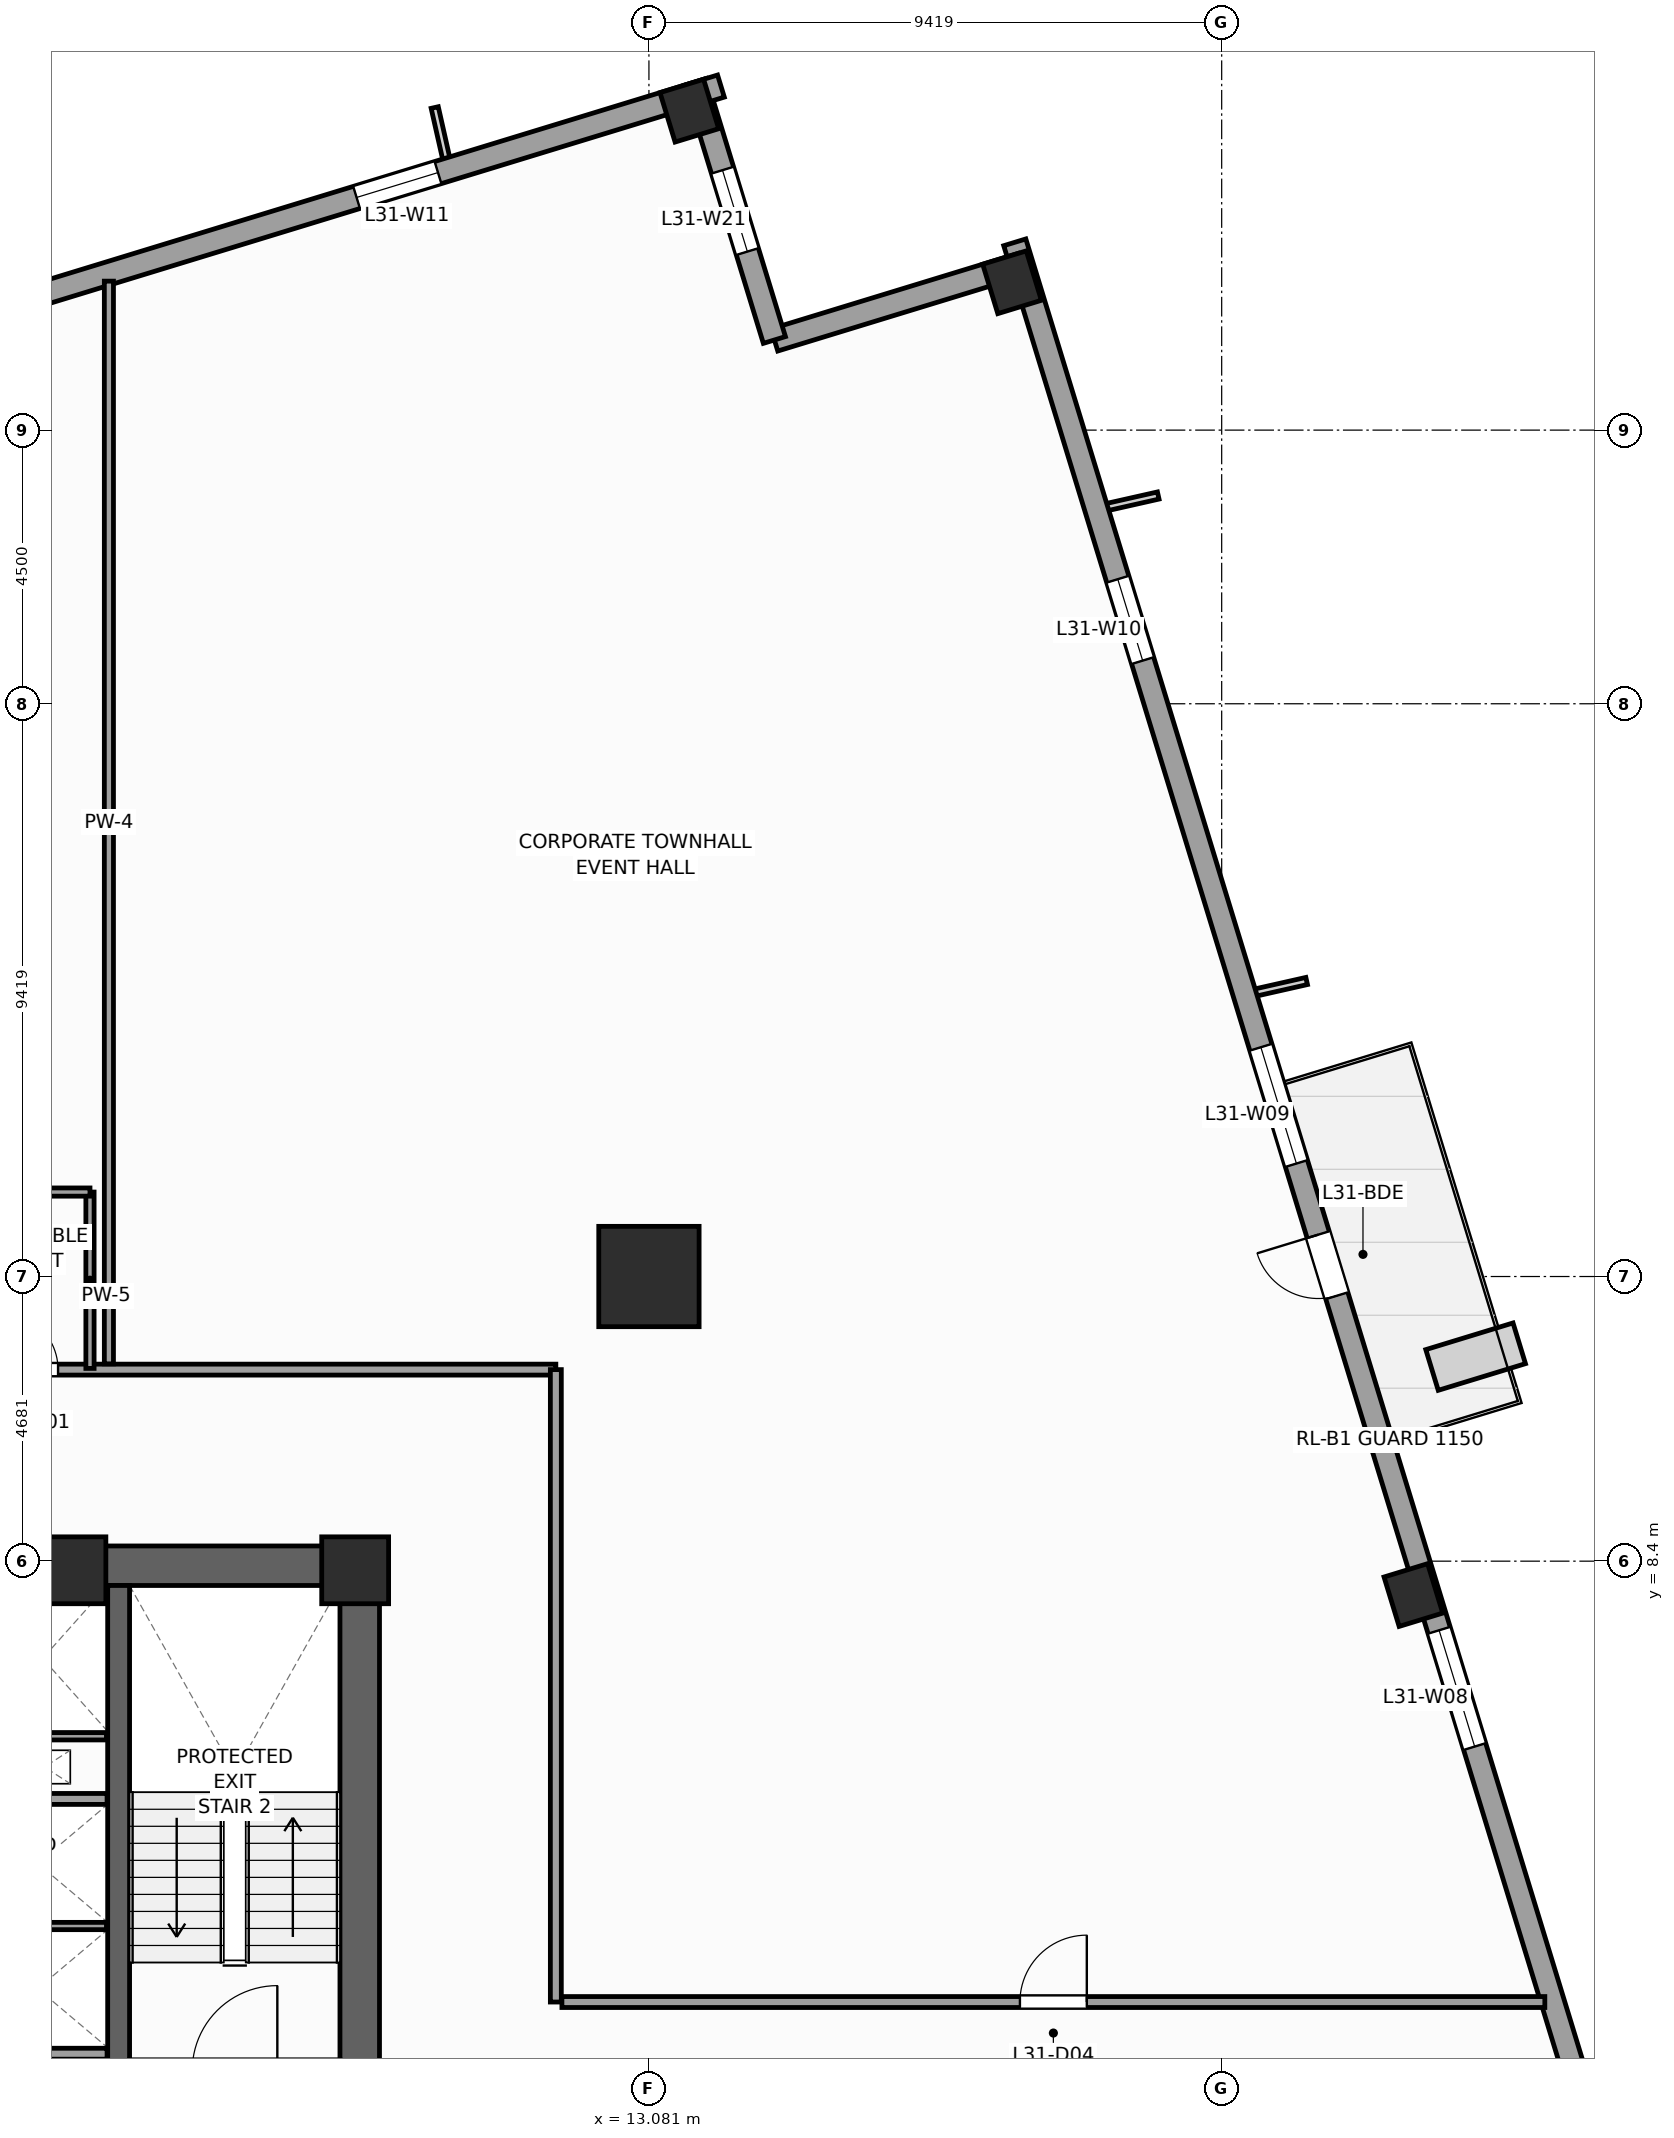
"""IFC4 building model, lengths in metres.
Left out: names, types, materials, properties, quantities, classifications, styles, units other than length and angle.
Written with IfcOpenShell. Run it as: python <this file> out.ifc"""

import sys

from ifc_helpers import new_model, si_unit, direction, frame, frame_2d, origin, origin_2d, place, context, subcontext, project, spatial, rectangle, extrude, source, transform, mapped, element, fill, save


model = new_model("IFC4")
c1 = context("Model", 3, precision=1e-05, world=origin(), true_north=direction((0.0, 1.0)))
c2 = subcontext(c1, "Body", "Model", "MODEL_VIEW")
j1 = project(units=[si_unit("LENGTHUNIT", "METRE"), si_unit("PLANEANGLEUNIT", "RADIAN")], contexts=[c1])
p1 = place(None, origin())
s1 = spatial("IfcSite", under=j1, at=p1, CompositionType="ELEMENT")
p2 = place(p1, origin())
s2 = spatial("IfcBuilding", under=s1, at=p2, CompositionType="ELEMENT")
p3 = place(p2, frame((0.0, 0.0, 131.2)))
s3 = spatial("IfcBuildingStorey", under=s2, at=p3, CompositionType="ELEMENT", Elevation=131.2)
p4 = place(p3, frame((-8.65, 8.325, 0.0), z_axis=(0.0, 0.0, 1.0), x_axis=(1.0, 0.0, 0.0)))
e1 = element("IfcWall", 1, at=p4, inside=s3, PredefinedType="SHEAR", context=c2, shape_type="SweptSolid", body=[
    extrude(rectangle(XDim=17.3, YDim=0.65, at=frame_2d((8.65, 0.0))), origin(), (0.0, 0.0, 1.0), 4.0),
])
p5 = place(p3, frame((8.325, -8.0, 0.0), z_axis=(0.0, 0.0, 1.0), x_axis=(0.0, 1.0, 0.0)))
e2 = element("IfcWall", 2, at=p5, inside=s3, PredefinedType="SHEAR", context=c2, shape_type="SweptSolid", body=[
    extrude(rectangle(XDim=16.0, YDim=0.65, at=frame_2d((8.0, 0.0))), origin(), (0.0, 0.0, 1.0), 4.0),
])
p6 = place(p5, frame((4.69, 0.0, 0.0)))
e3 = element("IfcOpeningElement", 3, at=p6, cuts=e2, PredefinedType="OPENING", context=c2, shape_type="SweptSolid", body=[
    extrude(rectangle(XDim=1.3, YDim=2.2, at=frame_2d((0.65, 1.1))), frame((0.0, 0.335, 0.0), z_axis=(0.0, -1.0, 0.0), x_axis=(1.0, 0.0, 0.0)), (0.0, 0.0, 1.0), 0.67),
])
p7 = place(p3, frame((4.36, -8.0, 0.0), z_axis=(0.0, 0.0, 1.0), x_axis=(0.0, 1.0, 0.0)))
e4 = element("IfcWall", 4, at=p7, inside=s3, PredefinedType="SHEAR", context=c2, shape_type="SweptSolid", body=[
    extrude(rectangle(XDim=16.0, YDim=0.36, at=frame_2d((8.0, 0.0))), origin(), (0.0, 0.0, 1.0), 4.0),
])
m1 = source(origin(), c2, "Body", "SweptSolid", [
    extrude(rectangle(XDim=1.1, YDim=1.1, at=origin_2d()), origin(), (0.0, 0.0, 1.0), 4.0),
])
for number, where, z_axis, x_axis in (
    (5, (8.25, 8.25, 0.0), (0.0, 0.0, 1.0), (1.0, 0.0, 0.0)),
    (6, (3.6, 8.25, 0.0), (0.0, 0.0, 1.0), (1.0, 0.0, 0.0)),
):
    element("IfcColumn", number, at=place(p3, frame(where, z_axis=z_axis, x_axis=x_axis)), inside=s3, PredefinedType="PILASTER", context=c2, shape_type="MappedRepresentation", body=[
        mapped(m1, transform((0.0, 0.0, 0.0), scale=1.0)),
    ])
m2 = source(origin(), c2, "Body", "SweptSolid", [
    extrude(rectangle(XDim=1.65, YDim=1.65, at=origin_2d()), origin(), (0.0, 0.0, 1.0), 4.0),
])
p8 = place(p3, frame((13.081, 13.081, 0.0), z_axis=(0.0, 0.0, 1.0), x_axis=(1.0, 0.0, 0.0)))
e7 = element("IfcColumn", 7, at=p8, inside=s3, PredefinedType="COLUMN", context=c2, shape_type="MappedRepresentation", body=[
    mapped(m2, transform((0.0, 0.0, 0.0), scale=1.0)),
])
m3 = source(origin(), c2, "Body", "SweptSolid", [
    extrude(rectangle(XDim=0.75, YDim=0.85, at=origin_2d()), origin(), (0.0, 0.0, 1.0), 4.0),
])
for number, where, z_axis, x_axis in (
    (8, (25.653, 7.843, 0.0), (0.0, 0.0, 1.0), (0.956, 0.292, 0.0)),
    (9, (19.052, 29.431, 0.0), (0.0, 0.0, 1.0), (0.956, 0.292, 0.0)),
    (10, (13.746, 32.253, 0.0), (0.0, 0.0, 1.0), (0.956, 0.292, 0.0)),
):
    element("IfcColumn", number, at=place(p3, frame(where, z_axis=z_axis, x_axis=x_axis)), inside=s3, PredefinedType="COLUMN", context=c2, shape_type="MappedRepresentation", body=[
        mapped(m3, transform((0.0, 0.0, 0.0), scale=1.0)),
    ])
p9 = place(p3, frame((32.658, -14.265, 0.0), z_axis=(0.0, 0.0, 1.0), x_axis=(-0.292373127906, 0.956304320851, 0.0)))
e11 = element("IfcWall", 11, at=p9, inside=s3, PredefinedType="STANDARD", context=c2, shape_type="SweptSolid", body=[
    extrude(rectangle(XDim=46.38, YDim=0.38, at=frame_2d((23.19, 0.0))), origin(), (0.0, 0.0, 1.0), 3.14),
])
p10 = place(p9, frame((28.265, 0.0, 0.0)))
e12 = element("IfcOpeningElement", 12, at=p10, cuts=e11, PredefinedType="OPENING", context=c2, shape_type="SweptSolid", body=[
    extrude(rectangle(XDim=1.05, YDim=2.25, at=frame_2d((0.525, 1.125))), frame((0.0, 0.2, 0.0), z_axis=(0.0, -1.0, 0.0), x_axis=(1.0, 0.0, 0.0)), (0.0, 0.0, 1.0), 0.4),
])
p11 = place(p9, frame((4.865, 0.0, 0.51)))
e13 = element("IfcOpeningElement", 13, at=p11, cuts=e11, PredefinedType="OPENING", context=c2, shape_type="SweptSolid", body=[
    extrude(rectangle(XDim=1.4, YDim=2.4, at=frame_2d((0.7, 1.2))), frame((0.0, 0.2, 0.0), z_axis=(0.0, -1.0, 0.0), x_axis=(1.0, 0.0, 0.0)), (0.0, 0.0, 1.0), 0.4),
])
p12 = place(p9, frame((10.95, 0.0, 0.51)))
e14 = element("IfcOpeningElement", 14, at=p12, cuts=e11, PredefinedType="OPENING", context=c2, shape_type="SweptSolid", body=[
    extrude(rectangle(XDim=2.0, YDim=2.4, at=frame_2d((1.0, 1.2))), frame((0.0, 0.2, 0.0), z_axis=(0.0, -1.0, 0.0), x_axis=(1.0, 0.0, 0.0)), (0.0, 0.0, 1.0), 0.4),
])
p13 = place(p9, frame((20.512, 0.0, 0.51)))
e15 = element("IfcOpeningElement", 15, at=p13, cuts=e11, PredefinedType="OPENING", context=c2, shape_type="SweptSolid", body=[
    extrude(rectangle(XDim=2.0, YDim=2.4, at=frame_2d((1.0, 1.2))), frame((0.0, 0.2, 0.0), z_axis=(0.0, -1.0, 0.0), x_axis=(1.0, 0.0, 0.0)), (0.0, 0.0, 1.0), 0.4),
])
p14 = place(p9, frame((30.538, 0.0, 0.51)))
e16 = element("IfcOpeningElement", 16, at=p14, cuts=e11, PredefinedType="OPENING", context=c2, shape_type="SweptSolid", body=[
    extrude(rectangle(XDim=2.0, YDim=2.4, at=frame_2d((1.0, 1.2))), frame((0.0, 0.2, 0.0), z_axis=(0.0, -1.0, 0.0), x_axis=(1.0, 0.0, 0.0)), (0.0, 0.0, 1.0), 0.4),
])
p15 = place(p9, frame((39.187, 0.0, 0.51)))
e17 = element("IfcOpeningElement", 17, at=p15, cuts=e11, PredefinedType="OPENING", context=c2, shape_type="SweptSolid", body=[
    extrude(rectangle(XDim=1.4, YDim=2.4, at=frame_2d((0.7, 1.2))), frame((0.0, 0.2, 0.0), z_axis=(0.0, -1.0, 0.0), x_axis=(1.0, 0.0, 0.0)), (0.0, 0.0, 1.0), 0.4),
])
p16 = place(p3, frame((19.208, 29.725, 0.0), z_axis=(0.0, 0.0, 1.0), x_axis=(-0.956312764915, -0.292345507338, 0.0)))
e18 = element("IfcWall", 18, at=p16, inside=s3, PredefinedType="STANDARD", context=c2, shape_type="SweptSolid", body=[
    extrude(rectangle(XDim=4.25, YDim=0.38, at=frame_2d((2.125, 0.0))), origin(), (0.0, 0.0, 1.0), 3.74),
])
p17 = place(p3, frame((15.144, 28.482, 0.0), z_axis=(0.0, 0.0, 1.0), x_axis=(-0.292373601522, 0.956304176051, 0.0)))
e19 = element("IfcWall", 19, at=p17, inside=s3, PredefinedType="STANDARD", context=c2, shape_type="SweptSolid", body=[
    extrude(rectangle(XDim=4.44, YDim=0.38, at=frame_2d((2.22, 0.0))), origin(), (0.0, 0.0, 1.0), 3.04),
])
p18 = place(p17, frame((1.52, 0.0, 0.51)))
e20 = element("IfcOpeningElement", 20, at=p18, cuts=e19, PredefinedType="OPENING", context=c2, shape_type="SweptSolid", body=[
    extrude(rectangle(XDim=1.4, YDim=2.4, at=frame_2d((0.7, 1.2))), frame((0.0, 0.2, 0.0), z_axis=(0.0, -1.0, 0.0), x_axis=(1.0, 0.0, 0.0)), (0.0, 0.0, 1.0), 0.4),
])
p19 = place(p3, frame((14.265, 32.658, 0.0), z_axis=(0.0, 0.0, 1.0), x_axis=(-0.956304320851, -0.292373127906, 0.0)))
e21 = element("IfcWall", 21, at=p19, inside=s3, PredefinedType="STANDARD", context=c2, shape_type="SweptSolid", body=[
    extrude(rectangle(XDim=46.38, YDim=0.38, at=frame_2d((23.19, 0.0))), origin(), (0.0, 0.0, 1.0), 3.14),
])
p20 = place(p19, frame((4.865, 0.0, 0.51)))
e22 = element("IfcOpeningElement", 22, at=p20, cuts=e21, PredefinedType="OPENING", context=c2, shape_type="SweptSolid", body=[
    extrude(rectangle(XDim=1.4, YDim=2.4, at=frame_2d((0.7, 1.2))), frame((0.0, 0.2, 0.0), z_axis=(0.0, -1.0, 0.0), x_axis=(1.0, 0.0, 0.0)), (0.0, 0.0, 1.0), 0.4),
])
p21 = place(p19, frame((12.45, 0.0, 0.51)))
e23 = element("IfcOpeningElement", 23, at=p21, cuts=e21, PredefinedType="OPENING", context=c2, shape_type="SweptSolid", body=[
    extrude(rectangle(XDim=2.0, YDim=2.4, at=frame_2d((1.0, 1.2))), frame((0.0, 0.2, 0.0), z_axis=(0.0, -1.0, 0.0), x_axis=(1.0, 0.0, 0.0)), (0.0, 0.0, 1.0), 0.4),
])
p22 = place(p19, frame((20.512, 0.0, 0.51)))
e24 = element("IfcOpeningElement", 24, at=p22, cuts=e21, PredefinedType="OPENING", context=c2, shape_type="SweptSolid", body=[
    extrude(rectangle(XDim=2.0, YDim=2.4, at=frame_2d((1.0, 1.2))), frame((0.0, 0.2, 0.0), z_axis=(0.0, -1.0, 0.0), x_axis=(1.0, 0.0, 0.0)), (0.0, 0.0, 1.0), 0.4),
])
p23 = place(p19, frame((30.538, 0.0, 0.51)))
e25 = element("IfcOpeningElement", 25, at=p23, cuts=e21, PredefinedType="OPENING", context=c2, shape_type="SweptSolid", body=[
    extrude(rectangle(XDim=2.0, YDim=2.4, at=frame_2d((1.0, 1.2))), frame((0.0, 0.2, 0.0), z_axis=(0.0, -1.0, 0.0), x_axis=(1.0, 0.0, 0.0)), (0.0, 0.0, 1.0), 0.4),
])
p24 = place(p19, frame((39.187, 0.0, 0.51)))
e26 = element("IfcOpeningElement", 26, at=p24, cuts=e21, PredefinedType="OPENING", context=c2, shape_type="SweptSolid", body=[
    extrude(rectangle(XDim=1.4, YDim=2.4, at=frame_2d((0.7, 1.2))), frame((0.0, 0.2, 0.0), z_axis=(0.0, -1.0, 0.0), x_axis=(1.0, 0.0, 0.0)), (0.0, 0.0, 1.0), 0.4),
])
for number, where, z_axis, x_axis in (
    (27, (1.89, 0.3, 0.0), (0.0, 0.0, 1.0), (1.0, 0.0, 0.0)),
    (28, (1.89, 4.49, 0.0), (0.0, 0.0, 1.0), (1.0, 0.0, 0.0)),
):
    element("IfcWall", number, at=place(p3, frame(where, z_axis=z_axis, x_axis=x_axis)), inside=s3, PredefinedType="PARTITIONING", context=c2, shape_type="SweptSolid", body=[
        extrude(rectangle(XDim=2.28, YDim=0.18, at=frame_2d((1.14, 0.0))), origin(), (0.0, 0.0, 1.0), 3.74),
    ])
p25 = place(p3, frame((1.9, 2.4, 0.0), z_axis=(0.0, 0.0, 1.0), x_axis=(1.0, 0.0, 0.0)))
e29 = element("IfcWall", 29, at=p25, inside=s3, PredefinedType="PARTITIONING", context=c2, shape_type="SweptSolid", body=[
    extrude(rectangle(XDim=2.26, YDim=0.12, at=frame_2d((1.13, 0.0))), origin(), (0.0, 0.0, 1.0), 3.74),
])
p26 = place(p3, frame((2.06, 5.52, 0.0), z_axis=(0.0, 0.0, 1.0), x_axis=(1.0, 0.0, 0.0)))
e30 = element("IfcWall", 30, at=p26, inside=s3, PredefinedType="PARTITIONING", context=c2, shape_type="SweptSolid", body=[
    extrude(rectangle(XDim=2.1, YDim=0.12, at=frame_2d((1.05, 0.0))), origin(), (0.0, 0.0, 1.0), 3.74),
])
p27 = place(p3, frame((-12.6, 11.55, 0.0), z_axis=(0.0, 0.0, 1.0), x_axis=(1.0, 0.0, 0.0)))
e31 = element("IfcWall", 31, at=p27, inside=s3, PredefinedType="PARTITIONING", context=c2, shape_type="SweptSolid", body=[
    extrude(rectangle(XDim=24.15, YDim=0.18, at=frame_2d((12.075, 0.0))), origin(), (0.0, 0.0, 1.0), 3.74),
])
p28 = place(p27, frame((15.014, 0.0, 0.0)))
e32 = element("IfcOpeningElement", 32, at=p28, cuts=e31, PredefinedType="OPENING", context=c2, shape_type="SweptSolid", body=[
    extrude(rectangle(XDim=0.95, YDim=2.1, at=frame_2d((0.475, 1.05))), frame((0.0, 0.1, 0.0), z_axis=(0.0, -1.0, 0.0), x_axis=(1.0, 0.0, 0.0)), (0.0, 0.0, 1.0), 0.2),
])
p29 = place(p27, frame((12.59, 0.0, 0.0)))
e33 = element("IfcOpeningElement", 33, at=p29, cuts=e31, PredefinedType="OPENING", context=c2, shape_type="SweptSolid", body=[
    extrude(rectangle(XDim=0.95, YDim=2.1, at=frame_2d((0.475, 1.05))), frame((0.0, 0.1, 0.0), z_axis=(0.0, -1.0, 0.0), x_axis=(1.0, 0.0, 0.0)), (0.0, 0.0, 1.0), 0.2),
])
p30 = place(p3, frame((11.55, 1.15, 0.0), z_axis=(0.0, 0.0, 1.0), x_axis=(0.0, 1.0, 0.0)))
e34 = element("IfcWall", 34, at=p30, inside=s3, PredefinedType="PARTITIONING", context=c2, shape_type="SweptSolid", body=[
    extrude(rectangle(XDim=10.4, YDim=0.18, at=frame_2d((5.2, 0.0))), origin(), (0.0, 0.0, 1.0), 3.74),
])
p31 = place(p3, frame((11.65, 1.15, 0.0), z_axis=(0.0, 0.0, 1.0), x_axis=(1.0, 0.0, 0.0)))
e35 = element("IfcWall", 35, at=p31, inside=s3, PredefinedType="PARTITIONING", context=c2, shape_type="SweptSolid", body=[
    extrude(rectangle(XDim=16.164, YDim=0.18, at=frame_2d((8.082, 0.0))), origin(), (0.0, 0.0, 1.0), 3.74),
])
p32 = place(p31, frame((7.532, 0.0, 0.0)))
e36 = element("IfcOpeningElement", 36, at=p32, cuts=e35, PredefinedType="OPENING", context=c2, shape_type="SweptSolid", body=[
    extrude(rectangle(XDim=1.1, YDim=2.2, at=frame_2d((0.55, 1.1))), frame((0.0, 0.1, 0.0), z_axis=(0.0, -1.0, 0.0), x_axis=(1.0, 0.0, 0.0)), (0.0, 0.0, 1.0), 0.2),
])
p33 = place(p3, frame((4.2, 11.645, 0.0), z_axis=(0.0, 0.0, 1.0), x_axis=(0.0, 1.0, 0.0)))
e37 = element("IfcWall", 37, at=p33, inside=s3, PredefinedType="PARTITIONING", context=c2, shape_type="SweptSolid", body=[
    extrude(rectangle(XDim=17.805, YDim=0.15, at=frame_2d((8.902, 0.0))), origin(), (0.0, 0.0, 1.0), 3.74),
])
p34 = place(p3, frame((3.889, 11.57, 0.0), z_axis=(0.0, 0.0, 1.0), x_axis=(0.0, 1.0, 0.0)))
e38 = element("IfcWall", 38, at=p34, inside=s3, PredefinedType="PARTITIONING", context=c2, shape_type="SweptSolid", body=[
    extrude(rectangle(XDim=2.9, YDim=0.135, at=frame_2d((1.45, 0.0))), origin(), (0.0, 0.0, 1.0), 3.74),
])
p35 = place(p3, frame((1.889, 14.47, 0.0), z_axis=(0.0, 0.0, 1.0), x_axis=(1.0, 0.0, 0.0)))
e39 = element("IfcWall", 39, at=p35, inside=s3, PredefinedType="PARTITIONING", context=c2, shape_type="SweptSolid", body=[
    extrude(rectangle(XDim=2.0, YDim=0.135, at=frame_2d((1.0, 0.0))), origin(), (0.0, 0.0, 1.0), 3.74),
])
m4 = source(origin(), c2, "Body", "SweptSolid", [
    extrude(rectangle(XDim=1.05, YDim=2.25, at=frame_2d((0.525, 1.125))), frame((0.0, 0.025, 0.0), z_axis=(0.0, -1.0, 0.0), x_axis=(1.0, 0.0, 0.0)), (0.0, 0.0, 1.0), 0.05),
])
p36 = place(p10, origin())
e40 = element("IfcDoor", 40, at=p36, inside=s3, OperationType="SINGLE_SWING_RIGHT", PredefinedType="DOOR", context=c2, shape_type="MappedRepresentation", body=[
    mapped(m4, transform((0.0, 0.0, 0.0), scale=1.0)),
])
fill(e12, e40)
m5 = source(origin(), c2, "Body", "SweptSolid", [
    extrude(rectangle(XDim=2.0, YDim=2.4, at=frame_2d((1.0, 1.2))), frame((0.0, 0.03, 0.0), z_axis=(0.0, -1.0, 0.0), x_axis=(1.0, 0.0, 0.0)), (0.0, 0.0, 1.0), 0.06),
])
p37 = place(p13, origin())
e41 = element("IfcWindow", 41, at=p37, inside=s3, PartitioningType="SINGLE_PANEL", PredefinedType="WINDOW", context=c2, shape_type="MappedRepresentation", body=[
    mapped(m5, transform((0.0, 0.0, 0.0), scale=1.0)),
])
fill(e15, e41)
p38 = place(p14, origin())
e42 = element("IfcWindow", 42, at=p38, inside=s3, PartitioningType="SINGLE_PANEL", PredefinedType="WINDOW", context=c2, shape_type="MappedRepresentation", body=[
    mapped(m5, transform((0.0, 0.0, 0.0), scale=1.0)),
])
fill(e16, e42)
m6 = source(origin(), c2, "Body", "SweptSolid", [
    extrude(rectangle(XDim=1.4, YDim=2.4, at=frame_2d((0.7, 1.2))), frame((0.0, 0.03, 0.0), z_axis=(0.0, -1.0, 0.0), x_axis=(1.0, 0.0, 0.0)), (0.0, 0.0, 1.0), 0.06),
])
p39 = place(p15, origin())
e43 = element("IfcWindow", 43, at=p39, inside=s3, PartitioningType="SINGLE_PANEL", PredefinedType="WINDOW", context=c2, shape_type="MappedRepresentation", body=[
    mapped(m6, transform((0.0, 0.0, 0.0), scale=1.0)),
])
fill(e17, e43)
p40 = place(p20, origin())
e44 = element("IfcWindow", 44, at=p40, inside=s3, PartitioningType="SINGLE_PANEL", PredefinedType="WINDOW", context=c2, shape_type="MappedRepresentation", body=[
    mapped(m6, transform((0.0, 0.0, 0.0), scale=1.0)),
])
fill(e22, e44)
p41 = place(p18, origin())
e45 = element("IfcWindow", 45, at=p41, inside=s3, PartitioningType="SINGLE_PANEL", PredefinedType="WINDOW", context=c2, shape_type="MappedRepresentation", body=[
    mapped(m6, transform((0.0, 0.0, 0.0), scale=1.0)),
])
fill(e20, e45)
m7 = source(origin(), c2, "Body", "SweptSolid", [
    extrude(rectangle(XDim=0.95, YDim=2.1, at=frame_2d((0.475, 1.05))), frame((0.0, 0.025, 0.0), z_axis=(0.0, -1.0, 0.0), x_axis=(1.0, 0.0, 0.0)), (0.0, 0.0, 1.0), 0.05),
])
p42 = place(p28, origin())
e46 = element("IfcDoor", 46, at=p42, inside=s3, OperationType="SINGLE_SWING_LEFT", PredefinedType="DOOR", context=c2, shape_type="MappedRepresentation", body=[
    mapped(m7, transform((0.0, 0.0, 0.0), scale=1.0)),
])
fill(e32, e46)
m8 = source(origin(), c2, "Body", "SweptSolid", [
    extrude(rectangle(XDim=1.1, YDim=2.2, at=frame_2d((0.55, 1.1))), frame((0.0, 0.025, 0.0), z_axis=(0.0, -1.0, 0.0), x_axis=(1.0, 0.0, 0.0)), (0.0, 0.0, 1.0), 0.05),
])
p43 = place(p32, origin())
e47 = element("IfcDoor", 47, at=p43, inside=s3, OperationType="SINGLE_SWING_RIGHT", PredefinedType="DOOR", context=c2, shape_type="MappedRepresentation", body=[
    mapped(m8, transform((0.0, 0.0, 0.0), scale=1.0)),
])
fill(e36, e47)
save(model, sys.argv[1])
